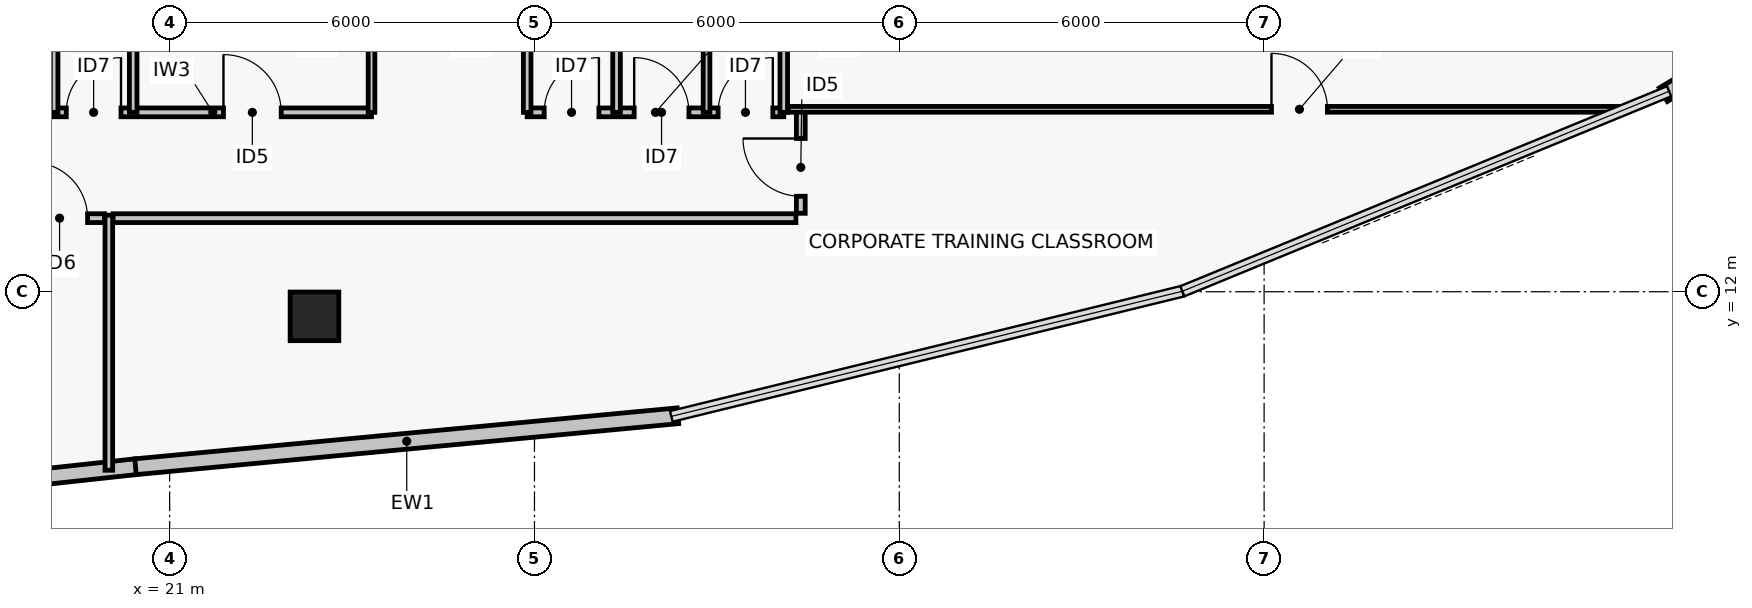
"""IFC4 building model, lengths in metres.
Left out: names, types, materials, properties, quantities, classifications, styles, units other than length and angle.
Written with IfcOpenShell. Run it as: python <this file> out.ifc"""

import sys

from ifc_helpers import new_model, si_unit, direction, frame, frame_2d, origin, origin_2d, place, context, subcontext, project, spatial, rectangle, hollow_rectangle, extrude, element, fill, save


model = new_model("IFC4")
c1 = context("Model", 3, precision=1e-05, world=origin(), true_north=direction((0.0, 1.0)))
c2 = subcontext(c1, "Body", "Model", "MODEL_VIEW")
j1 = project(units=[si_unit("LENGTHUNIT", "METRE"), si_unit("PLANEANGLEUNIT", "RADIAN")], contexts=[c1])
p1 = place(None, origin())
s1 = spatial("IfcSite", under=j1, at=p1, CompositionType="ELEMENT")
p2 = place(p1, origin())
s2 = spatial("IfcBuilding", under=s1, at=p2, CompositionType="ELEMENT")
p3 = place(p2, frame((0.0, 0.0, 234.42)))
s3 = spatial("IfcBuildingStorey", under=s2, at=p3, CompositionType="ELEMENT", Elevation=234.42)
p4 = place(p3, frame((23.382, 11.595, 0.0), z_axis=(0.0, 0.0, 1.0), x_axis=(1.0, 0.0, 0.0)))
e1 = element("IfcColumn", 1, at=p4, inside=s3, PredefinedType="COLUMN", context=c2, shape_type="SweptSolid", body=[
    extrude(hollow_rectangle(XDim=0.8, YDim=0.8, WallThickness=0.035, at=origin_2d()), origin(), (0.0, 0.0, 1.0), 3.72),
])
p5 = place(p3, frame((20.45, 9.123, 0.0), z_axis=(0.0, 0.0, 1.0), x_axis=(-0.994158757437, -0.107927591518, 0.0)))
e2 = element("IfcWall", 2, at=p5, inside=s3, PredefinedType="PARTITIONING", context=c2, shape_type="SweptSolid", body=[
    extrude(rectangle(XDim=5.062, YDim=0.26, at=frame_2d((2.531, 0.0))), origin(), (0.0, 0.0, 1.0), 3.44),
])
p6 = place(p3, frame((29.36, 9.96, 0.0), z_axis=(0.0, 0.0, 1.0), x_axis=(-0.995616246459, -0.093532292754, 0.0)))
e3 = element("IfcWall", 3, at=p6, inside=s3, PredefinedType="PARTITIONING", context=c2, shape_type="SweptSolid", body=[
    extrude(rectangle(XDim=8.961, YDim=0.26, at=frame_2d((4.48, 0.0))), origin(), (0.0, 0.0, 1.0), 3.44),
])
p7 = place(p3, frame((53.269, 19.819, 0.0), z_axis=(0.0, 0.0, 1.0), x_axis=(-0.859615449495, -0.510941561227, 0.0)))
e4 = element("IfcWall", 4, at=p7, inside=s3, PredefinedType="PARTITIONING", context=c2, shape_type="SweptSolid", body=[
    extrude(rectangle(XDim=8.961, YDim=0.26, at=frame_2d((4.48, 0.0))), origin(), (0.0, 0.0, 1.0), 3.44),
])
p8 = place(p3, frame((19.1, 14.95, 0.0), z_axis=(0.0, 0.0, 1.0), x_axis=(1.0, 0.0, 0.0)))
e5 = element("IfcWall", 5, at=p8, inside=s3, PredefinedType="PARTITIONING", context=c2, shape_type="SweptSolid", body=[
    extrude(rectangle(XDim=5.22, YDim=0.145, at=frame_2d((2.61, 0.0))), origin(), (0.0, 0.0, 1.0), 2.72),
])
p9 = place(p8, frame((0.2, 0.0, 0.0)))
e6 = element("IfcOpeningElement", 6, at=p9, cuts=e5, PredefinedType="OPENING", context=c2, shape_type="SweptSolid", body=[
    extrude(rectangle(XDim=0.9, YDim=2.02, at=frame_2d((0.45, 1.01))), frame((0.0, 0.083, 0.0), z_axis=(0.0, -1.0, 0.0), x_axis=(1.0, 0.0, 0.0)), (0.0, 0.0, 1.0), 0.165),
])
p10 = place(p8, frame((2.785, 0.0, 0.0)))
e7 = element("IfcOpeningElement", 7, at=p10, cuts=e5, PredefinedType="OPENING", context=c2, shape_type="SweptSolid", body=[
    extrude(rectangle(XDim=0.95, YDim=2.06, at=frame_2d((0.475, 1.03))), frame((0.0, 0.083, 0.0), z_axis=(0.0, -1.0, 0.0), x_axis=(1.0, 0.0, 0.0)), (0.0, 0.0, 1.0), 0.165),
])
p11 = place(p3, frame((26.88, 14.95, 0.0), z_axis=(0.0, 0.0, 1.0), x_axis=(1.0, 0.0, 0.0)))
e8 = element("IfcWall", 8, at=p11, inside=s3, PredefinedType="PARTITIONING", context=c2, shape_type="SweptSolid", body=[
    extrude(rectangle(XDim=4.22, YDim=0.145, at=frame_2d((2.11, 0.0))), origin(), (0.0, 0.0, 1.0), 2.92),
])
p12 = place(p11, frame((0.28, 0.0, 0.0)))
e9 = element("IfcOpeningElement", 9, at=p12, cuts=e8, PredefinedType="OPENING", context=c2, shape_type="SweptSolid", body=[
    extrude(rectangle(XDim=0.9, YDim=2.02, at=frame_2d((0.45, 1.01))), frame((0.0, 0.083, 0.0), z_axis=(0.0, -1.0, 0.0), x_axis=(1.0, 0.0, 0.0)), (0.0, 0.0, 1.0), 0.165),
])
p13 = place(p11, frame((1.76, 0.0, 0.0)))
e10 = element("IfcOpeningElement", 10, at=p13, cuts=e8, PredefinedType="OPENING", context=c2, shape_type="SweptSolid", body=[
    extrude(rectangle(XDim=0.9, YDim=2.02, at=frame_2d((0.45, 1.01))), frame((0.0, 0.083, 0.0), z_axis=(0.0, -1.0, 0.0), x_axis=(1.0, 0.0, 0.0)), (0.0, 0.0, 1.0), 0.165),
])
p14 = place(p11, frame((3.14, 0.0, 0.0)))
e11 = element("IfcOpeningElement", 11, at=p14, cuts=e8, PredefinedType="OPENING", context=c2, shape_type="SweptSolid", body=[
    extrude(rectangle(XDim=0.9, YDim=2.02, at=frame_2d((0.45, 1.01))), frame((0.0, 0.083, 0.0), z_axis=(0.0, -1.0, 0.0), x_axis=(1.0, 0.0, 0.0)), (0.0, 0.0, 1.0), 0.165),
])
for number, where, z_axis, x_axis in (
    (12, (19.1, 14.95, 0.0), (0.0, 0.0, 1.0), (0.0, 1.0, 0.0)),
    (13, (20.4, 14.95, 0.0), (0.0, 0.0, 1.0), (0.0, 1.0, 0.0)),
):
    element("IfcWall", number, at=place(p3, frame(where, z_axis=z_axis, x_axis=x_axis)), inside=s3, PredefinedType="PARTITIONING", context=c2, shape_type="SweptSolid", body=[
        extrude(rectangle(XDim=2.25, YDim=0.125, at=frame_2d((1.125, 0.0))), origin(), (0.0, 0.0, 1.0), 2.57),
    ])
p15 = place(p3, frame((24.32, 14.95, 0.0), z_axis=(0.0, 0.0, 1.0), x_axis=(0.0, 1.0, 0.0)))
e14 = element("IfcWall", 14, at=p15, inside=s3, PredefinedType="PARTITIONING", context=c2, shape_type="SweptSolid", body=[
    extrude(rectangle(XDim=2.25, YDim=0.11, at=frame_2d((1.125, 0.0))), origin(), (0.0, 0.0, 1.0), 2.57),
])
for number, where, z_axis, x_axis in (
    (15, (26.88, 14.95, 0.0), (0.0, 0.0, 1.0), (0.0, 1.0, 0.0)),
    (16, (28.35, 14.95, 0.0), (0.0, 0.0, 1.0), (0.0, 1.0, 0.0)),
):
    element("IfcWall", number, at=place(p3, frame(where, z_axis=z_axis, x_axis=x_axis)), inside=s3, PredefinedType="PARTITIONING", context=c2, shape_type="SweptSolid", body=[
        extrude(rectangle(XDim=2.25, YDim=0.125, at=frame_2d((1.125, 0.0))), origin(), (0.0, 0.0, 1.0), 2.57),
    ])
p16 = place(p3, frame((29.83, 14.95, 0.0), z_axis=(0.0, 0.0, 1.0), x_axis=(0.0, 1.0, 0.0)))
e17 = element("IfcWall", 17, at=p16, inside=s3, PredefinedType="PARTITIONING", context=c2, shape_type="SweptSolid", body=[
    extrude(rectangle(XDim=2.25, YDim=0.11, at=frame_2d((1.125, 0.0))), origin(), (0.0, 0.0, 1.0), 2.57),
])
p17 = place(p3, frame((31.1, 14.95, 0.0), z_axis=(0.0, 0.0, 1.0), x_axis=(0.0, 1.0, 0.0)))
e18 = element("IfcWall", 18, at=p17, inside=s3, PredefinedType="PARTITIONING", context=c2, shape_type="SweptSolid", body=[
    extrude(rectangle(XDim=2.25, YDim=0.125, at=frame_2d((1.125, 0.0))), origin(), (0.0, 0.0, 1.0), 2.57),
])
p18 = place(p3, frame((17.54, 13.21, 0.0), z_axis=(0.0, 0.0, 1.0), x_axis=(1.0, 0.0, 0.0)))
e19 = element("IfcWall", 19, at=p18, inside=s3, PredefinedType="PARTITIONING", context=c2, shape_type="SweptSolid", body=[
    extrude(rectangle(XDim=2.39, YDim=0.145, at=frame_2d((1.195, 0.0))), origin(), (0.0, 0.0, 1.0), 3.07),
])
p19 = place(p18, frame((1.19, 0.0, 0.0)))
e20 = element("IfcOpeningElement", 20, at=p19, cuts=e19, PredefinedType="OPENING", context=c2, shape_type="SweptSolid", body=[
    extrude(rectangle(XDim=0.92, YDim=2.05, at=frame_2d((0.46, 1.025))), frame((0.0, 0.083, 0.0), z_axis=(0.0, -1.0, 0.0), x_axis=(1.0, 0.0, 0.0)), (0.0, 0.0, 1.0), 0.165),
])
p20 = place(p3, frame((20.07, 13.21, 0.0), z_axis=(0.0, 0.0, 1.0), x_axis=(1.0, 0.0, 0.0)))
e21 = element("IfcWall", 21, at=p20, inside=s3, PredefinedType="PARTITIONING", context=c2, shape_type="SweptSolid", body=[
    extrude(rectangle(XDim=11.23, YDim=0.145, at=frame_2d((5.615, 0.0))), origin(), (0.0, 0.0, 1.0), 2.72),
])
p21 = place(p3, frame((31.38, 13.29, 0.0), z_axis=(0.0, 0.0, 1.0), x_axis=(0.0, 1.0, 0.0)))
e22 = element("IfcWall", 22, at=p21, inside=s3, PredefinedType="PARTITIONING", context=c2, shape_type="SweptSolid", body=[
    extrude(rectangle(XDim=1.71, YDim=0.145, at=frame_2d((0.855, 0.0))), origin(), (0.0, 0.0, 1.0), 3.44),
])
p22 = place(p21, frame((0.28, 0.0, 0.0)))
e23 = element("IfcOpeningElement", 23, at=p22, cuts=e22, PredefinedType="OPENING", context=c2, shape_type="SweptSolid", body=[
    extrude(rectangle(XDim=0.95, YDim=2.06, at=frame_2d((0.475, 1.03))), frame((0.0, 0.083, 0.0), z_axis=(0.0, -1.0, 0.0), x_axis=(1.0, 0.0, 0.0)), (0.0, 0.0, 1.0), 0.165),
])
p23 = place(p3, frame((20.0, 9.064, 0.0), z_axis=(0.0, 0.0, 1.0), x_axis=(0.0, 1.0, 0.0)))
e24 = element("IfcWall", 24, at=p23, inside=s3, PredefinedType="PARTITIONING", context=c2, shape_type="SweptSolid", body=[
    extrude(rectangle(XDim=4.196, YDim=0.125, at=frame_2d((2.098, 0.0))), origin(), (0.0, 0.0, 1.0), 2.92),
])
p24 = place(p3, frame((31.17, 15.0, 0.0), z_axis=(0.0, 0.0, 1.0), x_axis=(1.0, 0.0, 0.0)))
e25 = element("IfcWall", 25, at=p24, inside=s3, PredefinedType="PARTITIONING", context=c2, shape_type="SweptSolid", body=[
    extrude(rectangle(XDim=13.795, YDim=0.095, at=frame_2d((6.897, 0.0))), origin(), (0.0, 0.0, 1.0), 3.44),
])
p25 = place(p24, frame((7.951, 0.0, 0.0)))
e26 = element("IfcOpeningElement", 26, at=p25, cuts=e25, PredefinedType="OPENING", context=c2, shape_type="SweptSolid", body=[
    extrude(rectangle(XDim=0.92, YDim=2.05, at=frame_2d((0.46, 1.025))), frame((0.0, 0.057, 0.0), z_axis=(0.0, -1.0, 0.0), x_axis=(1.0, 0.0, 0.0)), (0.0, 0.0, 1.0), 0.115),
])
p26 = place(p9, origin())
e27 = element("IfcDoor", 27, at=p26, inside=s3, OperationType="SINGLE_SWING_RIGHT", PredefinedType="DOOR", context=c2, shape_type="SweptSolid", body=[
    extrude(rectangle(XDim=0.9, YDim=2.02, at=frame_2d((0.45, 1.01))), frame((0.0, 0.025, 0.0), z_axis=(0.0, -1.0, 0.0), x_axis=(1.0, 0.0, 0.0)), (0.0, 0.0, 1.0), 0.05),
])
fill(e6, e27)
p27 = place(p10, origin())
e28 = element("IfcDoor", 28, at=p27, inside=s3, OperationType="SINGLE_SWING_LEFT", PredefinedType="DOOR", context=c2, shape_type="SweptSolid", body=[
    extrude(rectangle(XDim=0.95, YDim=2.06, at=frame_2d((0.475, 1.03))), frame((0.0, 0.025, 0.0), z_axis=(0.0, -1.0, 0.0), x_axis=(1.0, 0.0, 0.0)), (0.0, 0.0, 1.0), 0.05),
])
fill(e7, e28)
p28 = place(p12, origin())
e29 = element("IfcDoor", 29, at=p28, inside=s3, OperationType="SINGLE_SWING_RIGHT", PredefinedType="DOOR", context=c2, shape_type="SweptSolid", body=[
    extrude(rectangle(XDim=0.9, YDim=2.02, at=frame_2d((0.45, 1.01))), frame((0.0, 0.025, 0.0), z_axis=(0.0, -1.0, 0.0), x_axis=(1.0, 0.0, 0.0)), (0.0, 0.0, 1.0), 0.05),
])
fill(e9, e29)
p29 = place(p13, origin())
e30 = element("IfcDoor", 30, at=p29, inside=s3, OperationType="SINGLE_SWING_LEFT", PredefinedType="DOOR", context=c2, shape_type="SweptSolid", body=[
    extrude(rectangle(XDim=0.9, YDim=2.02, at=frame_2d((0.45, 1.01))), frame((0.0, 0.025, 0.0), z_axis=(0.0, -1.0, 0.0), x_axis=(1.0, 0.0, 0.0)), (0.0, 0.0, 1.0), 0.05),
])
fill(e10, e30)
p30 = place(p14, origin())
e31 = element("IfcDoor", 31, at=p30, inside=s3, OperationType="SINGLE_SWING_RIGHT", PredefinedType="DOOR", context=c2, shape_type="SweptSolid", body=[
    extrude(rectangle(XDim=0.9, YDim=2.02, at=frame_2d((0.45, 1.01))), frame((0.0, 0.025, 0.0), z_axis=(0.0, -1.0, 0.0), x_axis=(1.0, 0.0, 0.0)), (0.0, 0.0, 1.0), 0.05),
])
fill(e11, e31)
p31 = place(p19, origin())
e32 = element("IfcDoor", 32, at=p31, inside=s3, OperationType="SINGLE_SWING_LEFT", PredefinedType="DOOR", context=c2, shape_type="SweptSolid", body=[
    extrude(rectangle(XDim=0.92, YDim=2.05, at=frame_2d((0.46, 1.025))), frame((0.0, 0.025, 0.0), z_axis=(0.0, -1.0, 0.0), x_axis=(1.0, 0.0, 0.0)), (0.0, 0.0, 1.0), 0.05),
])
fill(e20, e32)
p32 = place(p22, origin())
e33 = element("IfcDoor", 33, at=p32, inside=s3, OperationType="SINGLE_SWING_RIGHT", PredefinedType="DOOR", context=c2, shape_type="SweptSolid", body=[
    extrude(rectangle(XDim=0.95, YDim=2.06, at=frame_2d((0.475, 1.03))), frame((0.0, 0.025, 0.0), z_axis=(0.0, -1.0, 0.0), x_axis=(1.0, 0.0, 0.0)), (0.0, 0.0, 1.0), 0.05),
])
fill(e23, e33)
p33 = place(p25, origin())
e34 = element("IfcDoor", 34, at=p33, inside=s3, OperationType="SINGLE_SWING_LEFT", PredefinedType="DOOR", context=c2, shape_type="SweptSolid", body=[
    extrude(rectangle(XDim=0.92, YDim=2.05, at=frame_2d((0.46, 1.025))), frame((0.0, 0.025, 0.0), z_axis=(0.0, -1.0, 0.0), x_axis=(1.0, 0.0, 0.0)), (0.0, 0.0, 1.0), 0.05),
])
fill(e26, e34)
save(model, sys.argv[1])
